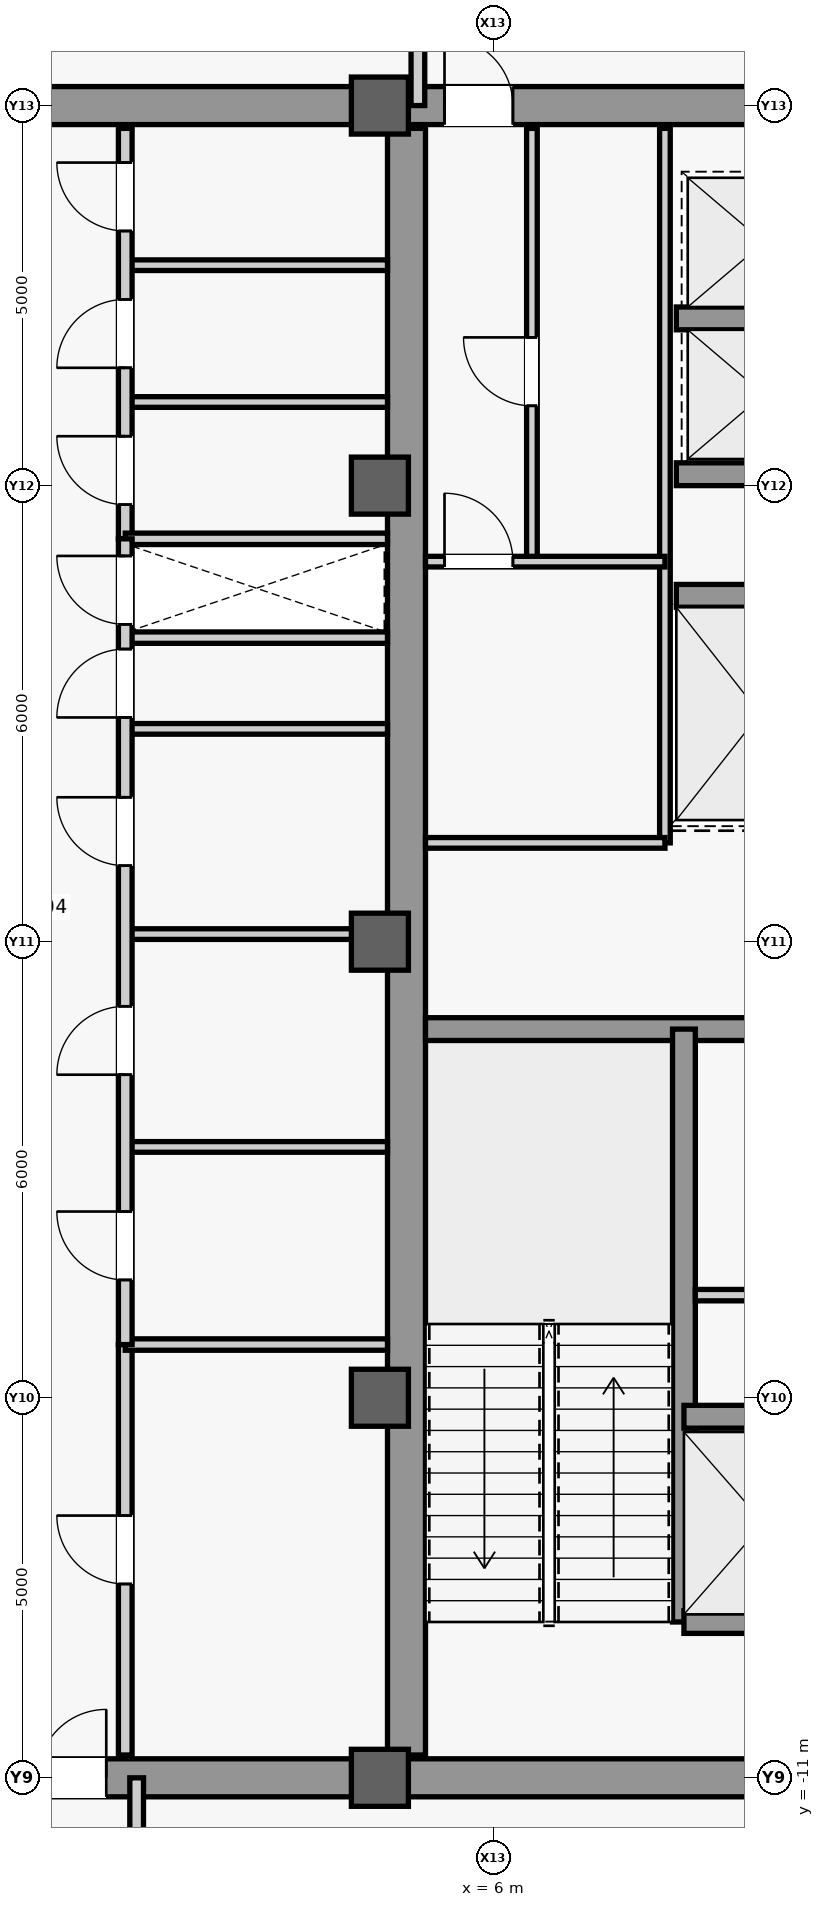
"""IFC4 building model, lengths in metres.
Left out: names, types, materials, properties, quantities, classifications, styles, units other than length and angle.
Written with IfcOpenShell. Run it as: python <this file> out.ifc"""

import sys

from ifc_helpers import new_model, si_unit, direction, frame, frame_2d, origin, origin_2d, place, context, subcontext, project, spatial, rectangle, extrude, source, transform, mapped, element, fill, save


model = new_model("IFC4")
c1 = context("Model", 3, precision=1e-05, world=origin(), true_north=direction((0.0, 1.0)))
c2 = subcontext(c1, "Body", "Model", "MODEL_VIEW")
j1 = project(units=[si_unit("LENGTHUNIT", "METRE"), si_unit("PLANEANGLEUNIT", "RADIAN")], contexts=[c1])
p1 = place(None, origin())
s1 = spatial("IfcSite", under=j1, at=p1, CompositionType="ELEMENT")
p2 = place(p1, origin())
s2 = spatial("IfcBuilding", under=s1, at=p2, CompositionType="ELEMENT")
p3 = place(p2, frame((0.0, 0.0, 370.3)))
s3 = spatial("IfcBuildingStorey", under=s2, at=p3, CompositionType="ELEMENT", Elevation=370.3)
m1 = source(origin(), c2, "Body", "SweptSolid", [
    extrude(rectangle(XDim=21.4, YDim=0.5, at=frame_2d((10.7, 0.0))), origin(), (0.0, 0.0, 1.0), 4.6),
])
p4 = place(p3, frame((4.85, -10.7, 0.0), z_axis=(0.0, 0.0, 1.0), x_axis=(0.0, 1.0, 0.0)))
e1 = element("IfcWall", 1, at=p4, inside=s3, PredefinedType="SHEAR", context=c2, shape_type="MappedRepresentation", body=[
    mapped(m1, transform((0.0, 0.0, 0.0), scale=1.0)),
])
m2 = source(origin(), c2, "Body", "SweptSolid", [
    extrude(rectangle(XDim=5.9, YDim=0.5, at=frame_2d((2.95, 0.0))), origin(), (0.0, 0.0, 1.0), 4.6),
])
p5 = place(p3, frame((4.85, -11.0, 0.0), z_axis=(0.0, 0.0, 1.0), x_axis=(1.0, 0.0, 0.0)))
e2 = element("IfcWall", 2, at=p5, inside=s3, PredefinedType="SHEAR", context=c2, shape_type="MappedRepresentation", body=[
    mapped(m2, transform((0.0, 0.0, 0.0), scale=1.0)),
])
p6 = place(p3, frame((4.85, 11.0, 0.0), z_axis=(0.0, 0.0, 1.0), x_axis=(1.0, 0.0, 0.0)))
e3 = element("IfcWall", 3, at=p6, inside=s3, PredefinedType="SHEAR", context=c2, shape_type="MappedRepresentation", body=[
    mapped(m2, transform((0.0, 0.0, 0.0), scale=1.0)),
])
m3 = source(origin(), c2, "Body", "SweptSolid", [
    extrude(rectangle(XDim=0.9, YDim=2.15, at=frame_2d((0.45, 1.075))), frame((0.0, 0.26, 0.0), z_axis=(0.0, -1.0, 0.0), x_axis=(1.0, 0.0, 0.0)), (0.0, 0.0, 1.0), 0.52),
])
p7 = place(p6, frame((0.5, 0.0, 0.0)))
e4 = element("IfcOpeningElement", 4, at=p7, cuts=e3, PredefinedType="OPENING", context=c2, shape_type="MappedRepresentation", body=[
    mapped(m3, transform((0.0, 0.0, 0.0), scale=1.0)),
])
m4 = source(origin(), c2, "Body", "SweptSolid", [
    extrude(rectangle(XDim=5.65, YDim=0.3, at=frame_2d((2.825, 0.0))), origin(), (0.0, 0.0, 1.0), 4.6),
])
p8 = place(p3, frame((5.1, -1.15, 0.0), z_axis=(0.0, 0.0, 1.0), x_axis=(1.0, 0.0, 0.0)))
e5 = element("IfcWall", 5, at=p8, inside=s3, PredefinedType="SHEAR", context=c2, shape_type="MappedRepresentation", body=[
    mapped(m4, transform((0.0, 0.0, 0.0), scale=1.0)),
])
m5 = source(origin(), c2, "Body", "SweptSolid", [
    extrude(rectangle(XDim=9.2, YDim=0.5, at=frame_2d((4.6, 0.0))), origin(), (0.0, 0.0, 1.0), 4.6),
])
p9 = place(p3, frame((-4.6, -11.0, 0.0), z_axis=(0.0, 0.0, 1.0), x_axis=(1.0, 0.0, 0.0)))
e6 = element("IfcWall", 6, at=p9, inside=s3, PredefinedType="SHEAR", context=c2, shape_type="MappedRepresentation", body=[
    mapped(m5, transform((0.0, 0.0, 0.0), scale=1.0)),
])
m6 = source(origin(), c2, "Body", "SweptSolid", [
    extrude(rectangle(XDim=1.8, YDim=2.25, at=frame_2d((0.9, 1.125))), frame((0.0, 0.26, 0.0), z_axis=(0.0, -1.0, 0.0), x_axis=(1.0, 0.0, 0.0)), (0.0, 0.0, 1.0), 0.52),
])
p10 = place(p9, frame((3.7, 0.0, 0.0)))
e7 = element("IfcOpeningElement", 7, at=p10, cuts=e6, PredefinedType="OPENING", context=c2, shape_type="MappedRepresentation", body=[
    mapped(m6, transform((0.0, 0.0, 0.0), scale=1.0)),
])
p11 = place(p3, frame((-4.6, 11.0, 0.0), z_axis=(0.0, 0.0, 1.0), x_axis=(1.0, 0.0, 0.0)))
e8 = element("IfcWall", 8, at=p11, inside=s3, PredefinedType="SHEAR", context=c2, shape_type="MappedRepresentation", body=[
    mapped(m5, transform((0.0, 0.0, 0.0), scale=1.0)),
])
m7 = source(origin(), c2, "Body", "SweptSolid", [
    extrude(rectangle(XDim=0.75, YDim=0.75, at=origin_2d()), origin(), (0.0, 0.0, 1.0), 5.2),
])
for number, where, z_axis, x_axis in (
    (9, (4.5, -11.0, 0.0), (0.0, 0.0, 1.0), (1.0, 0.0, 0.0)),
    (10, (4.5, -6.0, 0.0), (0.0, 0.0, 1.0), (1.0, 0.0, 0.0)),
    (11, (4.5, 0.0, 0.0), (0.0, 0.0, 1.0), (1.0, 0.0, 0.0)),
    (12, (4.5, 6.0, 0.0), (0.0, 0.0, 1.0), (1.0, 0.0, 0.0)),
    (13, (4.5, 11.0, 0.0), (0.0, 0.0, 1.0), (1.0, 0.0, 0.0)),
):
    element("IfcColumn", number, at=place(p3, frame(where, z_axis=z_axis, x_axis=x_axis)), inside=s3, PredefinedType="COLUMN", context=c2, shape_type="MappedRepresentation", body=[
        mapped(m7, transform((0.0, 0.0, 0.0), scale=1.0)),
    ])
m8 = source(origin(), c2, "Body", "SweptSolid", [
    extrude(rectangle(XDim=7.8, YDim=0.3, at=frame_2d((3.9, 0.0))), origin(), (0.0, 0.0, 1.0), 4.6),
])
p12 = place(p3, frame((8.5, -8.95, 0.0), z_axis=(0.0, 0.0, 1.0), x_axis=(0.0, 1.0, 0.0)))
e14 = element("IfcWall", 14, at=p12, inside=s3, PredefinedType="SHEAR", context=c2, shape_type="MappedRepresentation", body=[
    mapped(m8, transform((0.0, 0.0, 0.0), scale=1.0)),
])
m9 = source(origin(), c2, "Body", "SweptSolid", [
    extrude(rectangle(XDim=2.2, YDim=0.3, at=frame_2d((1.1, 0.0))), origin(), (0.0, 0.0, 1.0), 4.6),
])
for number, where, z_axis, x_axis in (
    (15, (8.5, -8.95, 0.0), (0.0, 0.0, 1.0), (1.0, 0.0, 0.0)),
    (16, (8.5, -6.25, 0.0), (0.0, 0.0, 1.0), (1.0, 0.0, 0.0)),
):
    element("IfcWall", number, at=place(p3, frame(where, z_axis=z_axis, x_axis=x_axis)), inside=s3, PredefinedType="SHEAR", context=c2, shape_type="MappedRepresentation", body=[
        mapped(m9, transform((0.0, 0.0, 0.0), scale=1.0)),
    ])
m10 = source(origin(), c2, "Body", "SweptSolid", [
    extrude(rectangle(XDim=2.3, YDim=0.3, at=frame_2d((1.15, 0.0))), origin(), (0.0, 0.0, 1.0), 4.6),
])
for number, where, z_axis, x_axis in (
    (17, (8.4, 4.55, 0.0), (0.0, 0.0, 1.0), (1.0, 0.0, 0.0)),
    (18, (8.4, 6.15, 0.0), (0.0, 0.0, 1.0), (1.0, 0.0, 0.0)),
    (19, (8.4, 8.2, 0.0), (0.0, 0.0, 1.0), (1.0, 0.0, 0.0)),
):
    element("IfcWall", number, at=place(p3, frame(where, z_axis=z_axis, x_axis=x_axis)), inside=s3, PredefinedType="SHEAR", context=c2, shape_type="MappedRepresentation", body=[
        mapped(m10, transform((0.0, 0.0, 0.0), scale=1.0)),
    ])
m11 = source(origin(), c2, "Body", "SweptSolid", [
    extrude(rectangle(XDim=2.05, YDim=0.15, at=frame_2d((1.025, 0.0))), origin(), (0.0, 0.0, 1.0), 4.6),
])
p13 = place(p3, frame((8.65, -4.65, 0.0), z_axis=(0.0, 0.0, 1.0), x_axis=(1.0, 0.0, 0.0)))
e20 = element("IfcWall", 20, at=p13, inside=s3, PredefinedType="PARTITIONING", context=c2, shape_type="MappedRepresentation", body=[
    mapped(m11, transform((0.0, 0.0, 0.0), scale=1.0)),
])
m12 = source(origin(), c2, "Body", "SweptSolid", [
    extrude(rectangle(XDim=9.4, YDim=0.14, at=frame_2d((4.7, 0.0))), origin(), (0.0, 0.0, 1.0), 4.6),
])
p14 = place(p3, frame((8.25, 1.3, 0.0), z_axis=(0.0, 0.0, 1.0), x_axis=(0.0, 1.0, 0.0)))
e21 = element("IfcWall", 21, at=p14, inside=s3, PredefinedType="PARTITIONING", context=c2, shape_type="MappedRepresentation", body=[
    mapped(m12, transform((0.0, 0.0, 0.0), scale=1.0)),
])
m13 = source(origin(), c2, "Body", "SweptSolid", [
    extrude(rectangle(XDim=3.15, YDim=0.14, at=frame_2d((1.575, 0.0))), origin(), (0.0, 0.0, 1.0), 4.6),
])
p15 = place(p3, frame((5.1, 1.3, 0.0), z_axis=(0.0, 0.0, 1.0), x_axis=(1.0, 0.0, 0.0)))
e22 = element("IfcWall", 22, at=p15, inside=s3, PredefinedType="PARTITIONING", context=c2, shape_type="MappedRepresentation", body=[
    mapped(m13, transform((0.0, 0.0, 0.0), scale=1.0)),
])
m14 = source(origin(), c2, "Body", "SweptSolid", [
    extrude(rectangle(XDim=5.7, YDim=0.14, at=frame_2d((2.85, 0.0))), origin(), (0.0, 0.0, 1.0), 4.6),
])
p16 = place(p3, frame((6.5, 5.0, 0.0), z_axis=(0.0, 0.0, 1.0), x_axis=(0.0, 1.0, 0.0)))
e23 = element("IfcWall", 23, at=p16, inside=s3, PredefinedType="PARTITIONING", context=c2, shape_type="MappedRepresentation", body=[
    mapped(m14, transform((0.0, 0.0, 0.0), scale=1.0)),
])
m15 = source(origin(), c2, "Body", "SweptSolid", [
    extrude(rectangle(XDim=0.9, YDim=2.15, at=frame_2d((0.45, 1.075))), frame((0.0, 0.08, 0.0), z_axis=(0.0, -1.0, 0.0), x_axis=(1.0, 0.0, 0.0)), (0.0, 0.0, 1.0), 0.16),
])
p17 = place(p16, frame((2.05, 0.0, 0.0)))
e24 = element("IfcOpeningElement", 24, at=p17, cuts=e23, PredefinedType="OPENING", context=c2, shape_type="MappedRepresentation", body=[
    mapped(m15, transform((0.0, 0.0, 0.0), scale=1.0)),
])
p18 = place(p3, frame((5.1, 5.0, 0.0), z_axis=(0.0, 0.0, 1.0), x_axis=(1.0, 0.0, 0.0)))
e25 = element("IfcWall", 25, at=p18, inside=s3, PredefinedType="PARTITIONING", context=c2, shape_type="MappedRepresentation", body=[
    mapped(m13, transform((0.0, 0.0, 0.0), scale=1.0)),
])
p19 = place(p18, frame((0.25, 0.0, 0.0)))
e26 = element("IfcOpeningElement", 26, at=p19, cuts=e25, PredefinedType="OPENING", context=c2, shape_type="MappedRepresentation", body=[
    mapped(m15, transform((0.0, 0.0, 0.0), scale=1.0)),
])
m16 = source(origin(), c2, "Body", "SweptSolid", [
    extrude(rectangle(XDim=3.45, YDim=0.15, at=frame_2d((1.725, 0.0))), origin(), (0.0, 0.0, 1.0), 4.6),
])
p20 = place(p3, frame((1.15, 4.0, 0.0), z_axis=(0.0, 0.0, 1.0), x_axis=(1.0, 0.0, 0.0)))
e27 = element("IfcWall", 27, at=p20, inside=s3, PredefinedType="PARTITIONING", context=c2, shape_type="MappedRepresentation", body=[
    mapped(m16, transform((0.0, 0.0, 0.0), scale=1.0)),
])
m17 = source(origin(), c2, "Body", "SweptSolid", [
    extrude(rectangle(XDim=5.4, YDim=0.18, at=frame_2d((2.7, 0.0))), origin(), (0.0, 0.0, 1.0), 4.6),
])
p21 = place(p3, frame((1.15, -10.7, 0.0), z_axis=(0.0, 0.0, 1.0), x_axis=(0.0, 1.0, 0.0)))
e28 = element("IfcWall", 28, at=p21, inside=s3, PredefinedType="PARTITIONING", context=c2, shape_type="MappedRepresentation", body=[
    mapped(m17, transform((0.0, 0.0, 0.0), scale=1.0)),
])
m18 = source(origin(), c2, "Body", "SweptSolid", [
    extrude(rectangle(XDim=0.9, YDim=2.15, at=frame_2d((0.45, 1.075))), frame((0.0, 0.1, 0.0), z_axis=(0.0, -1.0, 0.0), x_axis=(1.0, 0.0, 0.0)), (0.0, 0.0, 1.0), 0.2),
])
p22 = place(p21, frame((2.25, 0.0, 0.0)))
e29 = element("IfcOpeningElement", 29, at=p22, cuts=e28, PredefinedType="OPENING", context=c2, shape_type="MappedRepresentation", body=[
    mapped(m18, transform((0.0, 0.0, 0.0), scale=1.0)),
])
p23 = place(p3, frame((1.15, -5.3, 0.0), z_axis=(0.0, 0.0, 1.0), x_axis=(1.0, 0.0, 0.0)))
e30 = element("IfcWall", 30, at=p23, inside=s3, PredefinedType="PARTITIONING", context=c2, shape_type="MappedRepresentation", body=[
    mapped(m16, transform((0.0, 0.0, 0.0), scale=1.0)),
])
m19 = source(origin(), c2, "Body", "SweptSolid", [
    extrude(rectangle(XDim=3.45, YDim=0.14, at=frame_2d((1.725, 0.0))), origin(), (0.0, 0.0, 1.0), 4.6),
])
for number, where, z_axis, x_axis in (
    (31, (1.15, 7.1, 0.0), (0.0, 0.0, 1.0), (1.0, 0.0, 0.0)),
    (32, (1.15, 8.9, 0.0), (0.0, 0.0, 1.0), (1.0, 0.0, 0.0)),
):
    element("IfcWall", number, at=place(p3, frame(where, z_axis=z_axis, x_axis=x_axis)), inside=s3, PredefinedType="PARTITIONING", context=c2, shape_type="MappedRepresentation", body=[
        mapped(m19, transform((0.0, 0.0, 0.0), scale=1.0)),
    ])
p24 = place(p3, frame((1.15, 5.3, 0.0), z_axis=(0.0, 0.0, 1.0), x_axis=(0.0, 1.0, 0.0)))
e33 = element("IfcWall", 33, at=p24, inside=s3, PredefinedType="PARTITIONING", context=c2, shape_type="MappedRepresentation", body=[
    mapped(m17, transform((0.0, 0.0, 0.0), scale=1.0)),
])
p25 = place(p24, frame((0.45, 0.0, 0.0)))
e34 = element("IfcOpeningElement", 34, at=p25, cuts=e33, PredefinedType="OPENING", context=c2, shape_type="MappedRepresentation", body=[
    mapped(m18, transform((0.0, 0.0, 0.0), scale=1.0)),
])
p26 = place(p24, frame((2.25, 0.0, 0.0)))
e35 = element("IfcOpeningElement", 35, at=p26, cuts=e33, PredefinedType="OPENING", context=c2, shape_type="MappedRepresentation", body=[
    mapped(m18, transform((0.0, 0.0, 0.0), scale=1.0)),
])
p27 = place(p24, frame((4.05, 0.0, 0.0)))
e36 = element("IfcOpeningElement", 36, at=p27, cuts=e33, PredefinedType="OPENING", context=c2, shape_type="MappedRepresentation", body=[
    mapped(m18, transform((0.0, 0.0, 0.0), scale=1.0)),
])
p28 = place(p3, frame((1.15, 5.3, 0.0), z_axis=(0.0, 0.0, 1.0), x_axis=(1.0, 0.0, 0.0)))
e37 = element("IfcWall", 37, at=p28, inside=s3, PredefinedType="PARTITIONING", context=c2, shape_type="MappedRepresentation", body=[
    mapped(m16, transform((0.0, 0.0, 0.0), scale=1.0)),
])
p29 = place(p3, frame((1.15, -2.7, 0.0), z_axis=(0.0, 0.0, 1.0), x_axis=(1.0, 0.0, 0.0)))
e38 = element("IfcWall", 38, at=p29, inside=s3, PredefinedType="PARTITIONING", context=c2, shape_type="MappedRepresentation", body=[
    mapped(m19, transform((0.0, 0.0, 0.0), scale=1.0)),
])
m20 = source(origin(), c2, "Body", "SweptSolid", [
    extrude(rectangle(XDim=3.45, YDim=0.14, at=frame_2d((1.725, 0.0))), origin(), (0.0, 0.0, 1.0), 3.905),
])
p30 = place(p3, frame((1.15, 0.1, 0.0), z_axis=(0.0, 0.0, 1.0), x_axis=(1.0, 0.0, 0.0)))
e39 = element("IfcWall", 39, at=p30, inside=s3, PredefinedType="PARTITIONING", context=c2, shape_type="MappedRepresentation", body=[
    mapped(m20, transform((0.0, 0.0, 0.0), scale=1.0)),
])
p31 = place(p3, frame((1.15, 2.8, 0.0), z_axis=(0.0, 0.0, 1.0), x_axis=(1.0, 0.0, 0.0)))
e40 = element("IfcWall", 40, at=p31, inside=s3, PredefinedType="PARTITIONING", context=c2, shape_type="MappedRepresentation", body=[
    mapped(m19, transform((0.0, 0.0, 0.0), scale=1.0)),
])
m21 = source(origin(), c2, "Body", "SweptSolid", [
    extrude(rectangle(XDim=10.6, YDim=0.18, at=frame_2d((5.3, 0.0))), origin(), (0.0, 0.0, 1.0), 4.6),
])
p32 = place(p3, frame((1.15, -5.3, 0.0), z_axis=(0.0, 0.0, 1.0), x_axis=(0.0, 1.0, 0.0)))
e41 = element("IfcWall", 41, at=p32, inside=s3, PredefinedType="PARTITIONING", context=c2, shape_type="MappedRepresentation", body=[
    mapped(m21, transform((0.0, 0.0, 0.0), scale=1.0)),
])
p33 = place(p32, frame((0.85, 0.0, 0.0)))
e42 = element("IfcOpeningElement", 42, at=p33, cuts=e41, PredefinedType="OPENING", context=c2, shape_type="MappedRepresentation", body=[
    mapped(m18, transform((0.0, 0.0, 0.0), scale=1.0)),
])
p34 = place(p32, frame((3.55, 0.0, 0.0)))
e43 = element("IfcOpeningElement", 43, at=p34, cuts=e41, PredefinedType="OPENING", context=c2, shape_type="MappedRepresentation", body=[
    mapped(m18, transform((0.0, 0.0, 0.0), scale=1.0)),
])
p35 = place(p32, frame((6.3, 0.0, 0.0)))
e44 = element("IfcOpeningElement", 44, at=p35, cuts=e41, PredefinedType="OPENING", context=c2, shape_type="MappedRepresentation", body=[
    mapped(m18, transform((0.0, 0.0, 0.0), scale=1.0)),
])
p36 = place(p32, frame((8.25, 0.0, 0.0)))
e45 = element("IfcOpeningElement", 45, at=p36, cuts=e41, PredefinedType="OPENING", context=c2, shape_type="MappedRepresentation", body=[
    mapped(m18, transform((0.0, 0.0, 0.0), scale=1.0)),
])
p37 = place(p32, frame((9.475, 0.0, 0.0)))
e46 = element("IfcOpeningElement", 46, at=p37, cuts=e41, PredefinedType="OPENING", context=c2, shape_type="MappedRepresentation", body=[
    mapped(m18, transform((0.0, 0.0, 0.0), scale=1.0)),
])
m22 = source(origin(), c2, "Body", "SweptSolid", [
    extrude(rectangle(XDim=6.0, YDim=0.18, at=frame_2d((3.0, 0.0))), origin(), (0.0, 0.0, 1.0), 4.6),
])
p38 = place(p3, frame((1.3, -17.0, 0.0), z_axis=(0.0, 0.0, 1.0), x_axis=(0.0, 1.0, 0.0)))
e47 = element("IfcWall", 47, at=p38, inside=s3, PredefinedType="PARTITIONING", context=c2, shape_type="MappedRepresentation", body=[
    mapped(m22, transform((0.0, 0.0, 0.0), scale=1.0)),
])
m23 = source(origin(), c2, "Body", "SweptSolid", [
    extrude(rectangle(XDim=2.6, YDim=0.18, at=frame_2d((1.3, 0.0))), origin(), (0.0, 0.0, 1.0), 4.6),
])
p39 = place(p3, frame((5.0, 11.0, 0.0), z_axis=(0.0, 0.0, 1.0), x_axis=(0.0, 1.0, 0.0)))
e48 = element("IfcWall", 48, at=p39, inside=s3, PredefinedType="PARTITIONING", context=c2, shape_type="MappedRepresentation", body=[
    mapped(m23, transform((0.0, 0.0, 0.0), scale=1.0)),
])
p40 = place(p39, frame((0.85, 0.0, 0.0)))
e49 = element("IfcOpeningElement", 49, at=p40, cuts=e48, PredefinedType="OPENING", context=c2, shape_type="MappedRepresentation", body=[
    mapped(m18, transform((0.0, 0.0, 0.0), scale=1.0)),
])
m24 = source(origin(), c2, "Body", "SweptSolid", [
    extrude(rectangle(XDim=0.9, YDim=2.15, at=frame_2d((0.45, 1.075))), frame((0.0, 0.025, 0.0), z_axis=(0.0, -1.0, 0.0), x_axis=(1.0, 0.0, 0.0)), (0.0, 0.0, 1.0), 0.05),
])
p41 = place(p7, origin())
e50 = element("IfcDoor", 50, at=p41, inside=s3, OperationType="SINGLE_SWING_LEFT", PredefinedType="DOOR", context=c2, shape_type="MappedRepresentation", body=[
    mapped(m24, transform((0.0, 0.0, 0.0), scale=1.0)),
])
fill(e4, e50)
p42 = place(p17, origin())
e51 = element("IfcDoor", 51, at=p42, inside=s3, OperationType="SINGLE_SWING_RIGHT", PredefinedType="DOOR", context=c2, shape_type="MappedRepresentation", body=[
    mapped(m24, transform((0.0, 0.0, 0.0), scale=1.0)),
])
fill(e24, e51)
p43 = place(p19, origin())
e52 = element("IfcDoor", 52, at=p43, inside=s3, OperationType="SINGLE_SWING_LEFT", PredefinedType="DOOR", context=c2, shape_type="MappedRepresentation", body=[
    mapped(m24, transform((0.0, 0.0, 0.0), scale=1.0)),
])
fill(e26, e52)
p44 = place(p22, origin())
e53 = element("IfcDoor", 53, at=p44, inside=s3, OperationType="SINGLE_SWING_RIGHT", PredefinedType="DOOR", context=c2, shape_type="MappedRepresentation", body=[
    mapped(m24, transform((0.0, 0.0, 0.0), scale=1.0)),
])
fill(e29, e53)
m25 = source(origin(), c2, "Body", "SweptSolid", [
    extrude(rectangle(XDim=1.8, YDim=2.25, at=frame_2d((0.9, 1.125))), frame((0.0, 0.025, 0.0), z_axis=(0.0, -1.0, 0.0), x_axis=(1.0, 0.0, 0.0)), (0.0, 0.0, 1.0), 0.05),
])
p45 = place(p10, origin())
e54 = element("IfcDoor", 54, at=p45, inside=s3, OperationType="SINGLE_SWING_LEFT", PredefinedType="DOOR", context=c2, shape_type="MappedRepresentation", body=[
    mapped(m25, transform((0.0, 0.0, 0.0), scale=1.0)),
])
fill(e7, e54)
p46 = place(p25, origin())
e55 = element("IfcDoor", 55, at=p46, inside=s3, OperationType="SINGLE_SWING_RIGHT", PredefinedType="DOOR", context=c2, shape_type="MappedRepresentation", body=[
    mapped(m24, transform((0.0, 0.0, 0.0), scale=1.0)),
])
fill(e34, e55)
p47 = place(p26, origin())
e56 = element("IfcDoor", 56, at=p47, inside=s3, OperationType="SINGLE_SWING_LEFT", PredefinedType="DOOR", context=c2, shape_type="MappedRepresentation", body=[
    mapped(m24, transform((0.0, 0.0, 0.0), scale=1.0)),
])
fill(e35, e56)
p48 = place(p27, origin())
e57 = element("IfcDoor", 57, at=p48, inside=s3, OperationType="SINGLE_SWING_RIGHT", PredefinedType="DOOR", context=c2, shape_type="MappedRepresentation", body=[
    mapped(m24, transform((0.0, 0.0, 0.0), scale=1.0)),
])
fill(e36, e57)
p49 = place(p33, origin())
e58 = element("IfcDoor", 58, at=p49, inside=s3, OperationType="SINGLE_SWING_RIGHT", PredefinedType="DOOR", context=c2, shape_type="MappedRepresentation", body=[
    mapped(m24, transform((0.0, 0.0, 0.0), scale=1.0)),
])
fill(e42, e58)
p50 = place(p34, origin())
e59 = element("IfcDoor", 59, at=p50, inside=s3, OperationType="SINGLE_SWING_LEFT", PredefinedType="DOOR", context=c2, shape_type="MappedRepresentation", body=[
    mapped(m24, transform((0.0, 0.0, 0.0), scale=1.0)),
])
fill(e43, e59)
p51 = place(p35, origin())
e60 = element("IfcDoor", 60, at=p51, inside=s3, OperationType="SINGLE_SWING_RIGHT", PredefinedType="DOOR", context=c2, shape_type="MappedRepresentation", body=[
    mapped(m24, transform((0.0, 0.0, 0.0), scale=1.0)),
])
fill(e44, e60)
p52 = place(p36, origin())
e61 = element("IfcDoor", 61, at=p52, inside=s3, OperationType="SINGLE_SWING_LEFT", PredefinedType="DOOR", context=c2, shape_type="MappedRepresentation", body=[
    mapped(m24, transform((0.0, 0.0, 0.0), scale=1.0)),
])
fill(e45, e61)
p53 = place(p37, origin())
e62 = element("IfcDoor", 62, at=p53, inside=s3, OperationType="SINGLE_SWING_RIGHT", PredefinedType="DOOR", context=c2, shape_type="MappedRepresentation", body=[
    mapped(m24, transform((0.0, 0.0, 0.0), scale=1.0)),
])
fill(e46, e62)
save(model, sys.argv[1])
